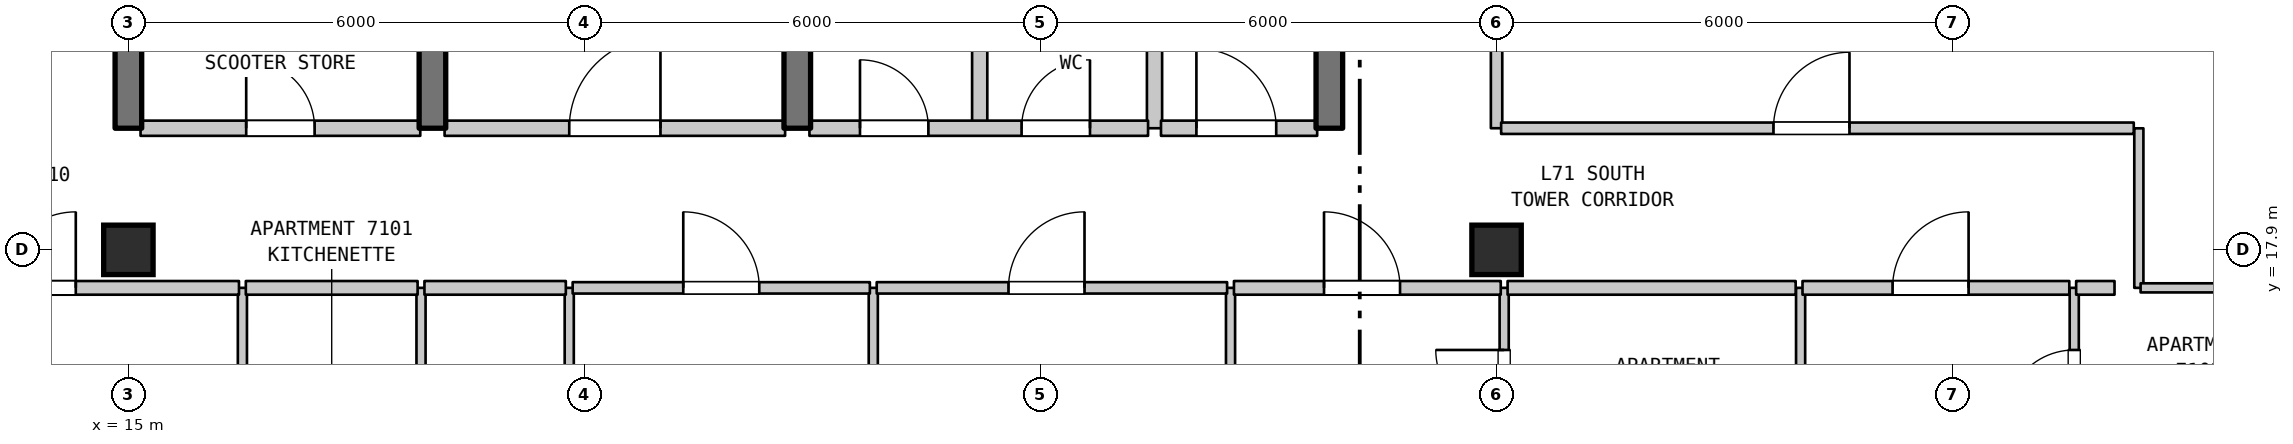
"""IFC4 building model, lengths in metres.
Left out: names, types, materials, properties, quantities, classifications, styles, units other than length and angle.
Written with IfcOpenShell. Run it as: python <this file> out.ifc"""

import sys

from ifc_helpers import new_model, si_unit, direction, frame, frame_2d, origin, origin_2d, place, context, subcontext, project, spatial, rectangle, extrude, element, fill, save


model = new_model("IFC4")
c1 = context("Model", 3, precision=1e-05, world=origin(), true_north=direction((0.0, 1.0)))
c2 = subcontext(c1, "Body", "Model", "MODEL_VIEW")
j1 = project(units=[si_unit("LENGTHUNIT", "METRE"), si_unit("PLANEANGLEUNIT", "RADIAN")], contexts=[c1])
p1 = place(None, origin())
s1 = spatial("IfcSite", under=j1, at=p1, CompositionType="ELEMENT")
p2 = place(p1, origin())
s2 = spatial("IfcBuilding", under=s1, at=p2, CompositionType="ELEMENT")
p3 = place(p2, frame((0.0, 0.0, 284.3)))
s3 = spatial("IfcBuildingStorey", under=s2, at=p3, CompositionType="ELEMENT", Elevation=284.3)
for number, where, z_axis, x_axis in (
    (1, (15.0, 17.9, 0.0), (0.0, 0.0, 1.0), (1.0, 0.0, 0.0)),
    (2, (33.0, 17.9, 0.0), (0.0, 0.0, 1.0), (1.0, 0.0, 0.0)),
):
    element("IfcColumn", number, at=place(p3, frame(where, z_axis=z_axis, x_axis=x_axis)), inside=s3, PredefinedType="COLUMN", context=c2, shape_type="SweptSolid", body=[
        extrude(rectangle(XDim=0.65, YDim=0.65, at=origin_2d()), origin(), (0.0, 0.0, 1.0), 3.7),
    ])
p4 = place(p3, frame((15.0, 19.5, 0.0), z_axis=(0.0, 0.0, 1.0), x_axis=(0.0, 1.0, 0.0)))
e3 = element("IfcWall", 3, at=p4, inside=s3, PredefinedType="SHEAR", context=c2, shape_type="SweptSolid", body=[
    extrude(rectangle(XDim=3.2, YDim=0.35, at=frame_2d((1.6, 0.0))), origin(), (0.0, 0.0, 1.0), 3.39),
])
p5 = place(p3, frame((16.5, 14.2, 0.0), z_axis=(0.0, 0.0, 1.0), x_axis=(0.0, 1.0, 0.0)))
e4 = element("IfcWall", 4, at=p5, inside=s3, PredefinedType="PARTITIONING", context=c2, shape_type="SweptSolid", body=[
    extrude(rectangle(XDim=3.2, YDim=0.12, at=frame_2d((1.6, 0.0))), origin(), (0.0, 0.0, 1.0), 3.39),
])
p6 = place(p5, frame((1.15, 0.0, 0.0)))
e5 = element("IfcOpeningElement", 5, at=p6, cuts=e4, PredefinedType="OPENING", context=c2, shape_type="SweptSolid", body=[
    extrude(rectangle(XDim=0.9, YDim=2.15, at=frame_2d((0.45, 1.075))), frame((0.0, 0.07, 0.0), z_axis=(0.0, -1.0, 0.0), x_axis=(1.0, 0.0, 0.0)), (0.0, 0.0, 1.0), 0.14),
])
p7 = place(p3, frame((18.85, 14.2, 0.0), z_axis=(0.0, 0.0, 1.0), x_axis=(0.0, 1.0, 0.0)))
e6 = element("IfcWall", 6, at=p7, inside=s3, PredefinedType="PARTITIONING", context=c2, shape_type="SweptSolid", body=[
    extrude(rectangle(XDim=3.2, YDim=0.12, at=frame_2d((1.6, 0.0))), origin(), (0.0, 0.0, 1.0), 3.39),
])
p8 = place(p3, frame((19.0, 19.5, 0.0), z_axis=(0.0, 0.0, 1.0), x_axis=(0.0, 1.0, 0.0)))
e7 = element("IfcWall", 7, at=p8, inside=s3, PredefinedType="SHEAR", context=c2, shape_type="SweptSolid", body=[
    extrude(rectangle(XDim=3.2, YDim=0.35, at=frame_2d((1.6, 0.0))), origin(), (0.0, 0.0, 1.0), 3.39),
])
p9 = place(p3, frame((20.8, 7.075, 0.0), z_axis=(0.0, 0.0, 1.0), x_axis=(0.0, 1.0, 0.0)))
e8 = element("IfcWall", 8, at=p9, inside=s3, PredefinedType="PARTITIONING", context=c2, shape_type="SweptSolid", body=[
    extrude(rectangle(XDim=10.325, YDim=0.12, at=frame_2d((5.163, 0.0))), origin(), (0.0, 0.0, 1.0), 3.39),
])
p10 = place(p3, frame((23.8, 19.5, 0.0), z_axis=(0.0, 0.0, 1.0), x_axis=(0.0, 1.0, 0.0)))
e9 = element("IfcWall", 9, at=p10, inside=s3, PredefinedType="SHEAR", context=c2, shape_type="SweptSolid", body=[
    extrude(rectangle(XDim=3.2, YDim=0.35, at=frame_2d((1.6, 0.0))), origin(), (0.0, 0.0, 1.0), 3.39),
])
p11 = place(p3, frame((24.8, 6.71, 0.0), z_axis=(0.0, 0.0, 1.0), x_axis=(0.0, 1.0, 0.0)))
e10 = element("IfcWall", 10, at=p11, inside=s3, PredefinedType="PARTITIONING", context=c2, shape_type="SweptSolid", body=[
    extrude(rectangle(XDim=10.69, YDim=0.12, at=frame_2d((5.345, 0.0))), origin(), (0.0, 0.0, 1.0), 3.39),
])
for number, where, z_axis, x_axis in (
    (11, (26.2, 19.5, 0.0), (0.0, 0.0, 1.0), (0.0, 1.0, 0.0)),
    (12, (28.5, 19.5, 0.0), (0.0, 0.0, 1.0), (0.0, 1.0, 0.0)),
):
    element("IfcWall", number, at=place(p3, frame(where, z_axis=z_axis, x_axis=x_axis)), inside=s3, PredefinedType="STANDARD", context=c2, shape_type="SweptSolid", body=[
        extrude(rectangle(XDim=3.2, YDim=0.2, at=frame_2d((1.6, 0.0))), origin(), (0.0, 0.0, 1.0), 3.39),
    ])
p12 = place(p3, frame((29.5, 6.71, 0.0), z_axis=(0.0, 0.0, 1.0), x_axis=(0.0, 1.0, 0.0)))
e13 = element("IfcWall", 13, at=p12, inside=s3, PredefinedType="PARTITIONING", context=c2, shape_type="SweptSolid", body=[
    extrude(rectangle(XDim=10.69, YDim=0.12, at=frame_2d((5.345, 0.0))), origin(), (0.0, 0.0, 1.0), 3.39),
])
p13 = place(p3, frame((30.8, 19.5, 0.0), z_axis=(0.0, 0.0, 1.0), x_axis=(0.0, 1.0, 0.0)))
e14 = element("IfcWall", 14, at=p13, inside=s3, PredefinedType="SHEAR", context=c2, shape_type="SweptSolid", body=[
    extrude(rectangle(XDim=3.2, YDim=0.35, at=frame_2d((1.6, 0.0))), origin(), (0.0, 0.0, 1.0), 3.39),
])
p14 = place(p3, frame((33.0, 19.5, 0.0), z_axis=(0.0, 0.0, 1.0), x_axis=(0.0, 1.0, 0.0)))
e15 = element("IfcWall", 15, at=p14, inside=s3, PredefinedType="STANDARD", context=c2, shape_type="SweptSolid", body=[
    extrude(rectangle(XDim=8.4, YDim=0.15, at=frame_2d((4.2, 0.0))), origin(), (0.0, 0.0, 1.0), 3.1),
])
p15 = place(p3, frame((33.1, 15.008, 0.0), z_axis=(0.0, 0.0, 1.0), x_axis=(0.0, 1.0, 0.0)))
e16 = element("IfcWall", 16, at=p15, inside=s3, PredefinedType="PARTITIONING", context=c2, shape_type="SweptSolid", body=[
    extrude(rectangle(XDim=2.392, YDim=0.12, at=frame_2d((1.196, 0.0))), origin(), (0.0, 0.0, 1.0), 3.1),
])
p16 = place(p15, frame((0.675, 0.0, 0.0)))
e17 = element("IfcOpeningElement", 17, at=p16, cuts=e16, PredefinedType="OPENING", context=c2, shape_type="SweptSolid", body=[
    extrude(rectangle(XDim=0.9, YDim=2.1, at=frame_2d((0.45, 1.05))), frame((0.0, 0.07, 0.0), z_axis=(0.0, -1.0, 0.0), x_axis=(1.0, 0.0, 0.0)), (0.0, 0.0, 1.0), 0.14),
])
p17 = place(p3, frame((37.0, 15.008, 0.0), z_axis=(0.0, 0.0, 1.0), x_axis=(0.0, 1.0, 0.0)))
e18 = element("IfcWall", 18, at=p17, inside=s3, PredefinedType="PARTITIONING", context=c2, shape_type="SweptSolid", body=[
    extrude(rectangle(XDim=2.392, YDim=0.12, at=frame_2d((1.196, 0.0))), origin(), (0.0, 0.0, 1.0), 3.39),
])
p18 = place(p3, frame((40.6, 15.008, 0.0), z_axis=(0.0, 0.0, 1.0), x_axis=(0.0, 1.0, 0.0)))
e19 = element("IfcWall", 19, at=p18, inside=s3, PredefinedType="PARTITIONING", context=c2, shape_type="SweptSolid", body=[
    extrude(rectangle(XDim=2.392, YDim=0.12, at=frame_2d((1.196, 0.0))), origin(), (0.0, 0.0, 1.0), 3.39),
])
p19 = place(p18, frame((0.675, 0.0, 0.0)))
e20 = element("IfcOpeningElement", 20, at=p19, cuts=e19, PredefinedType="OPENING", context=c2, shape_type="SweptSolid", body=[
    extrude(rectangle(XDim=0.9, YDim=2.1, at=frame_2d((0.45, 1.05))), frame((0.0, 0.07, 0.0), z_axis=(0.0, -1.0, 0.0), x_axis=(1.0, 0.0, 0.0)), (0.0, 0.0, 1.0), 0.14),
])
p20 = place(p3, frame((41.45, 17.4, 0.0), z_axis=(0.0, 0.0, 1.0), x_axis=(0.0, 1.0, 0.0)))
e21 = element("IfcWall", 21, at=p20, inside=s3, PredefinedType="PARTITIONING", context=c2, shape_type="SweptSolid", body=[
    extrude(rectangle(XDim=2.099, YDim=0.12, at=frame_2d((1.05, 0.0))), origin(), (0.0, 0.0, 1.0), 3.39),
])
p21 = place(p3, frame((12.975, 17.4, 0.0), z_axis=(0.0, 0.0, 1.0), x_axis=(1.0, 0.0, 0.0)))
e22 = element("IfcWall", 22, at=p21, inside=s3, PredefinedType="STANDARD", context=c2, shape_type="SweptSolid", body=[
    extrude(rectangle(XDim=3.48, YDim=0.18, at=frame_2d((1.74, 0.0))), origin(), (0.0, 0.0, 1.0), 3.39),
])
p22 = place(p21, frame((0.333, 0.0, 0.0)))
e23 = element("IfcOpeningElement", 23, at=p22, cuts=e22, PredefinedType="OPENING", context=c2, shape_type="SweptSolid", body=[
    extrude(rectangle(XDim=1.0, YDim=2.15, at=frame_2d((0.5, 1.075))), frame((0.0, 0.1, 0.0), z_axis=(0.0, -1.0, 0.0), x_axis=(1.0, 0.0, 0.0)), (0.0, 0.0, 1.0), 0.2),
])
p23 = place(p3, frame((16.545, 17.4, 0.0), z_axis=(0.0, 0.0, 1.0), x_axis=(1.0, 0.0, 0.0)))
e24 = element("IfcWall", 24, at=p23, inside=s3, PredefinedType="STANDARD", context=c2, shape_type="SweptSolid", body=[
    extrude(rectangle(XDim=2.26, YDim=0.18, at=frame_2d((1.13, 0.0))), origin(), (0.0, 0.0, 1.0), 3.39),
])
p24 = place(p3, frame((18.895, 17.4, 0.0), z_axis=(0.0, 0.0, 1.0), x_axis=(1.0, 0.0, 0.0)))
e25 = element("IfcWall", 25, at=p24, inside=s3, PredefinedType="STANDARD", context=c2, shape_type="SweptSolid", body=[
    extrude(rectangle(XDim=1.86, YDim=0.18, at=frame_2d((0.93, 0.0))), origin(), (0.0, 0.0, 1.0), 3.39),
])
p25 = place(p3, frame((20.845, 17.4, 0.0), z_axis=(0.0, 0.0, 1.0), x_axis=(1.0, 0.0, 0.0)))
e26 = element("IfcWall", 26, at=p25, inside=s3, PredefinedType="STANDARD", context=c2, shape_type="SweptSolid", body=[
    extrude(rectangle(XDim=3.91, YDim=0.15, at=frame_2d((1.955, 0.0))), origin(), (0.0, 0.0, 1.0), 3.39),
])
p26 = place(p25, frame((1.455, 0.0, 0.0)))
e27 = element("IfcOpeningElement", 27, at=p26, cuts=e26, PredefinedType="OPENING", context=c2, shape_type="SweptSolid", body=[
    extrude(rectangle(XDim=1.0, YDim=2.15, at=frame_2d((0.5, 1.075))), frame((0.0, 0.085, 0.0), z_axis=(0.0, -1.0, 0.0), x_axis=(1.0, 0.0, 0.0)), (0.0, 0.0, 1.0), 0.17),
])
p27 = place(p3, frame((24.845, 17.4, 0.0), z_axis=(0.0, 0.0, 1.0), x_axis=(1.0, 0.0, 0.0)))
e28 = element("IfcWall", 28, at=p27, inside=s3, PredefinedType="STANDARD", context=c2, shape_type="SweptSolid", body=[
    extrude(rectangle(XDim=4.61, YDim=0.15, at=frame_2d((2.305, 0.0))), origin(), (0.0, 0.0, 1.0), 3.39),
])
p28 = place(p27, frame((1.734, 0.0, 0.0)))
e29 = element("IfcOpeningElement", 29, at=p28, cuts=e28, PredefinedType="OPENING", context=c2, shape_type="SweptSolid", body=[
    extrude(rectangle(XDim=1.0, YDim=2.15, at=frame_2d((0.5, 1.075))), frame((0.0, 0.085, 0.0), z_axis=(0.0, -1.0, 0.0), x_axis=(1.0, 0.0, 0.0)), (0.0, 0.0, 1.0), 0.17),
])
p29 = place(p3, frame((29.545, 17.4, 0.0), z_axis=(0.0, 0.0, 1.0), x_axis=(1.0, 0.0, 0.0)))
e30 = element("IfcWall", 30, at=p29, inside=s3, PredefinedType="STANDARD", context=c2, shape_type="SweptSolid", body=[
    extrude(rectangle(XDim=3.51, YDim=0.18, at=frame_2d((1.755, 0.0))), origin(), (0.0, 0.0, 1.0), 3.39),
])
p30 = place(p29, frame((1.185, 0.0, 0.0)))
e31 = element("IfcOpeningElement", 31, at=p30, cuts=e30, PredefinedType="OPENING", context=c2, shape_type="SweptSolid", body=[
    extrude(rectangle(XDim=1.0, YDim=2.15, at=frame_2d((0.5, 1.075))), frame((0.0, 0.1, 0.0), z_axis=(0.0, -1.0, 0.0), x_axis=(1.0, 0.0, 0.0)), (0.0, 0.0, 1.0), 0.2),
])
p31 = place(p3, frame((33.145, 17.4, 0.0), z_axis=(0.0, 0.0, 1.0), x_axis=(1.0, 0.0, 0.0)))
e32 = element("IfcWall", 32, at=p31, inside=s3, PredefinedType="STANDARD", context=c2, shape_type="SweptSolid", body=[
    extrude(rectangle(XDim=3.79, YDim=0.18, at=frame_2d((1.895, 0.0))), origin(), (0.0, 0.0, 1.0), 3.39),
])
p32 = place(p3, frame((37.025, 17.4, 0.0), z_axis=(0.0, 0.0, 1.0), x_axis=(1.0, 0.0, 0.0)))
e33 = element("IfcWall", 33, at=p32, inside=s3, PredefinedType="STANDARD", context=c2, shape_type="SweptSolid", body=[
    extrude(rectangle(XDim=3.51, YDim=0.18, at=frame_2d((1.755, 0.0))), origin(), (0.0, 0.0, 1.0), 3.39),
])
p33 = place(p32, frame((1.185, 0.0, 0.0)))
e34 = element("IfcOpeningElement", 34, at=p33, cuts=e33, PredefinedType="OPENING", context=c2, shape_type="SweptSolid", body=[
    extrude(rectangle(XDim=1.0, YDim=2.15, at=frame_2d((0.5, 1.075))), frame((0.0, 0.1, 0.0), z_axis=(0.0, -1.0, 0.0), x_axis=(1.0, 0.0, 0.0)), (0.0, 0.0, 1.0), 0.2),
])
p34 = place(p3, frame((40.625, 17.4, 0.0), z_axis=(0.0, 0.0, 1.0), x_axis=(1.0, 0.0, 0.0)))
e35 = element("IfcWall", 35, at=p34, inside=s3, PredefinedType="STANDARD", context=c2, shape_type="SweptSolid", body=[
    extrude(rectangle(XDim=0.505, YDim=0.18, at=frame_2d((0.252, 0.0))), origin(), (0.0, 0.0, 1.0), 3.39),
])
p35 = place(p3, frame((41.473, 17.4, 0.0), z_axis=(0.0, 0.0, 1.0), x_axis=(1.0, 0.0, 0.0)))
e36 = element("IfcWall", 36, at=p35, inside=s3, PredefinedType="PARTITIONING", context=c2, shape_type="SweptSolid", body=[
    extrude(rectangle(XDim=2.031, YDim=0.12, at=frame_2d((1.016, 0.0))), origin(), (0.0, 0.0, 1.0), 3.39),
])
p36 = place(p3, frame((15.16, 19.5, 0.0), z_axis=(0.0, 0.0, 1.0), x_axis=(1.0, 0.0, 0.0)))
e37 = element("IfcWall", 37, at=p36, inside=s3, PredefinedType="STANDARD", context=c2, shape_type="SweptSolid", body=[
    extrude(rectangle(XDim=3.68, YDim=0.2, at=frame_2d((1.84, 0.0))), origin(), (0.0, 0.0, 1.0), 3.39),
])
p37 = place(p36, frame((1.39, 0.0, 0.0)))
e38 = element("IfcOpeningElement", 38, at=p37, cuts=e37, PredefinedType="OPENING", context=c2, shape_type="SweptSolid", body=[
    extrude(rectangle(XDim=0.9, YDim=2.15, at=frame_2d((0.45, 1.075))), frame((0.0, 0.11, 0.0), z_axis=(0.0, -1.0, 0.0), x_axis=(1.0, 0.0, 0.0)), (0.0, 0.0, 1.0), 0.22),
])
p38 = place(p3, frame((19.16, 19.5, 0.0), z_axis=(0.0, 0.0, 1.0), x_axis=(1.0, 0.0, 0.0)))
e39 = element("IfcWall", 39, at=p38, inside=s3, PredefinedType="STANDARD", context=c2, shape_type="SweptSolid", body=[
    extrude(rectangle(XDim=4.48, YDim=0.2, at=frame_2d((2.24, 0.0))), origin(), (0.0, 0.0, 1.0), 3.39),
])
p39 = place(p38, frame((1.64, 0.0, 0.0)))
e40 = element("IfcOpeningElement", 40, at=p39, cuts=e39, PredefinedType="OPENING", context=c2, shape_type="SweptSolid", body=[
    extrude(rectangle(XDim=1.2, YDim=2.2, at=frame_2d((0.6, 1.1))), frame((0.0, 0.11, 0.0), z_axis=(0.0, -1.0, 0.0), x_axis=(1.0, 0.0, 0.0)), (0.0, 0.0, 1.0), 0.22),
])
p40 = place(p3, frame((23.96, 19.5, 0.0), z_axis=(0.0, 0.0, 1.0), x_axis=(1.0, 0.0, 0.0)))
e41 = element("IfcWall", 41, at=p40, inside=s3, PredefinedType="STANDARD", context=c2, shape_type="SweptSolid", body=[
    extrude(rectangle(XDim=4.455, YDim=0.2, at=frame_2d((2.228, 0.0))), origin(), (0.0, 0.0, 1.0), 3.39),
])
p41 = place(p40, frame((0.665, 0.0, 0.0)))
e42 = element("IfcOpeningElement", 42, at=p41, cuts=e41, PredefinedType="OPENING", context=c2, shape_type="SweptSolid", body=[
    extrude(rectangle(XDim=0.9, YDim=2.15, at=frame_2d((0.45, 1.075))), frame((0.0, 0.11, 0.0), z_axis=(0.0, -1.0, 0.0), x_axis=(1.0, 0.0, 0.0)), (0.0, 0.0, 1.0), 0.22),
])
p42 = place(p40, frame((2.791, 0.0, 0.0)))
e43 = element("IfcOpeningElement", 43, at=p42, cuts=e41, PredefinedType="OPENING", context=c2, shape_type="SweptSolid", body=[
    extrude(rectangle(XDim=0.9, YDim=2.15, at=frame_2d((0.45, 1.075))), frame((0.0, 0.11, 0.0), z_axis=(0.0, -1.0, 0.0), x_axis=(1.0, 0.0, 0.0)), (0.0, 0.0, 1.0), 0.22),
])
p43 = place(p3, frame((28.585, 19.5, 0.0), z_axis=(0.0, 0.0, 1.0), x_axis=(1.0, 0.0, 0.0)))
e44 = element("IfcWall", 44, at=p43, inside=s3, PredefinedType="STANDARD", context=c2, shape_type="SweptSolid", body=[
    extrude(rectangle(XDim=2.055, YDim=0.2, at=frame_2d((1.027, 0.0))), origin(), (0.0, 0.0, 1.0), 3.39),
])
p44 = place(p43, frame((0.466, 0.0, 0.0)))
e45 = element("IfcOpeningElement", 45, at=p44, cuts=e44, PredefinedType="OPENING", context=c2, shape_type="SweptSolid", body=[
    extrude(rectangle(XDim=1.05, YDim=2.15, at=frame_2d((0.525, 1.075))), frame((0.0, 0.11, 0.0), z_axis=(0.0, -1.0, 0.0), x_axis=(1.0, 0.0, 0.0)), (0.0, 0.0, 1.0), 0.22),
])
p45 = place(p3, frame((33.06, 19.5, 0.0), z_axis=(0.0, 0.0, 1.0), x_axis=(1.0, 0.0, 0.0)))
e46 = element("IfcWall", 46, at=p45, inside=s3, PredefinedType="STANDARD", context=c2, shape_type="SweptSolid", body=[
    extrude(rectangle(XDim=8.323, YDim=0.15, at=frame_2d((4.162, 0.0))), origin(), (0.0, 0.0, 1.0), 3.39),
])
p46 = place(p45, frame((3.583, 0.0, 0.0)))
e47 = element("IfcOpeningElement", 47, at=p46, cuts=e46, PredefinedType="OPENING", context=c2, shape_type="SweptSolid", body=[
    extrude(rectangle(XDim=1.0, YDim=2.15, at=frame_2d((0.5, 1.075))), frame((0.0, 0.085, 0.0), z_axis=(0.0, -1.0, 0.0), x_axis=(1.0, 0.0, 0.0)), (0.0, 0.0, 1.0), 0.17),
])
p47 = place(p16, origin())
e48 = element("IfcDoor", 48, at=p47, inside=s3, OperationType="SINGLE_SWING_RIGHT", PredefinedType="DOOR", context=c2, shape_type="SweptSolid", body=[
    extrude(rectangle(XDim=0.9, YDim=2.1, at=frame_2d((0.45, 1.05))), frame((0.0, 0.025, 0.0), z_axis=(0.0, -1.0, 0.0), x_axis=(1.0, 0.0, 0.0)), (0.0, 0.0, 1.0), 0.05),
])
fill(e17, e48)
p48 = place(p19, origin())
e49 = element("IfcDoor", 49, at=p48, inside=s3, OperationType="SINGLE_SWING_LEFT", PredefinedType="DOOR", context=c2, shape_type="SweptSolid", body=[
    extrude(rectangle(XDim=0.9, YDim=2.1, at=frame_2d((0.45, 1.05))), frame((0.0, 0.025, 0.0), z_axis=(0.0, -1.0, 0.0), x_axis=(1.0, 0.0, 0.0)), (0.0, 0.0, 1.0), 0.05),
])
fill(e20, e49)
p49 = place(p22, origin())
e50 = element("IfcDoor", 50, at=p49, inside=s3, OperationType="SINGLE_SWING_RIGHT", PredefinedType="DOOR", context=c2, shape_type="SweptSolid", body=[
    extrude(rectangle(XDim=1.0, YDim=2.15, at=frame_2d((0.5, 1.075))), frame((0.0, 0.025, 0.0), z_axis=(0.0, -1.0, 0.0), x_axis=(1.0, 0.0, 0.0)), (0.0, 0.0, 1.0), 0.05),
])
fill(e23, e50)
p50 = place(p26, origin())
e51 = element("IfcDoor", 51, at=p50, inside=s3, OperationType="SINGLE_SWING_LEFT", PredefinedType="DOOR", context=c2, shape_type="SweptSolid", body=[
    extrude(rectangle(XDim=1.0, YDim=2.15, at=frame_2d((0.5, 1.075))), frame((0.0, 0.025, 0.0), z_axis=(0.0, -1.0, 0.0), x_axis=(1.0, 0.0, 0.0)), (0.0, 0.0, 1.0), 0.05),
])
fill(e27, e51)
p51 = place(p28, origin())
e52 = element("IfcDoor", 52, at=p51, inside=s3, OperationType="SINGLE_SWING_RIGHT", PredefinedType="DOOR", context=c2, shape_type="SweptSolid", body=[
    extrude(rectangle(XDim=1.0, YDim=2.15, at=frame_2d((0.5, 1.075))), frame((0.0, 0.025, 0.0), z_axis=(0.0, -1.0, 0.0), x_axis=(1.0, 0.0, 0.0)), (0.0, 0.0, 1.0), 0.05),
])
fill(e29, e52)
p52 = place(p30, origin())
e53 = element("IfcDoor", 53, at=p52, inside=s3, OperationType="SINGLE_SWING_LEFT", PredefinedType="DOOR", context=c2, shape_type="SweptSolid", body=[
    extrude(rectangle(XDim=1.0, YDim=2.15, at=frame_2d((0.5, 1.075))), frame((0.0, 0.025, 0.0), z_axis=(0.0, -1.0, 0.0), x_axis=(1.0, 0.0, 0.0)), (0.0, 0.0, 1.0), 0.05),
])
fill(e31, e53)
p53 = place(p33, origin())
e54 = element("IfcDoor", 54, at=p53, inside=s3, OperationType="SINGLE_SWING_RIGHT", PredefinedType="DOOR", context=c2, shape_type="SweptSolid", body=[
    extrude(rectangle(XDim=1.0, YDim=2.15, at=frame_2d((0.5, 1.075))), frame((0.0, 0.025, 0.0), z_axis=(0.0, -1.0, 0.0), x_axis=(1.0, 0.0, 0.0)), (0.0, 0.0, 1.0), 0.05),
])
fill(e34, e54)
p54 = place(p37, origin())
e55 = element("IfcDoor", 55, at=p54, inside=s3, OperationType="SINGLE_SWING_LEFT", PredefinedType="DOOR", context=c2, shape_type="SweptSolid", body=[
    extrude(rectangle(XDim=0.9, YDim=2.15, at=frame_2d((0.45, 1.075))), frame((0.0, 0.025, 0.0), z_axis=(0.0, -1.0, 0.0), x_axis=(1.0, 0.0, 0.0)), (0.0, 0.0, 1.0), 0.05),
])
fill(e38, e55)
p55 = place(p39, origin())
e56 = element("IfcDoor", 56, at=p55, inside=s3, OperationType="SINGLE_SWING_RIGHT", PredefinedType="DOOR", context=c2, shape_type="SweptSolid", body=[
    extrude(rectangle(XDim=1.2, YDim=2.2, at=frame_2d((0.6, 1.1))), frame((0.0, 0.025, 0.0), z_axis=(0.0, -1.0, 0.0), x_axis=(1.0, 0.0, 0.0)), (0.0, 0.0, 1.0), 0.05),
])
fill(e40, e56)
p56 = place(p41, origin())
e57 = element("IfcDoor", 57, at=p56, inside=s3, OperationType="SINGLE_SWING_LEFT", PredefinedType="DOOR", context=c2, shape_type="SweptSolid", body=[
    extrude(rectangle(XDim=0.9, YDim=2.15, at=frame_2d((0.45, 1.075))), frame((0.0, 0.025, 0.0), z_axis=(0.0, -1.0, 0.0), x_axis=(1.0, 0.0, 0.0)), (0.0, 0.0, 1.0), 0.05),
])
fill(e42, e57)
p57 = place(p42, origin())
e58 = element("IfcDoor", 58, at=p57, inside=s3, OperationType="SINGLE_SWING_RIGHT", PredefinedType="DOOR", context=c2, shape_type="SweptSolid", body=[
    extrude(rectangle(XDim=0.9, YDim=2.15, at=frame_2d((0.45, 1.075))), frame((0.0, 0.025, 0.0), z_axis=(0.0, -1.0, 0.0), x_axis=(1.0, 0.0, 0.0)), (0.0, 0.0, 1.0), 0.05),
])
fill(e43, e58)
p58 = place(p44, origin())
e59 = element("IfcDoor", 59, at=p58, inside=s3, OperationType="SINGLE_SWING_LEFT", PredefinedType="DOOR", context=c2, shape_type="SweptSolid", body=[
    extrude(rectangle(XDim=1.05, YDim=2.15, at=frame_2d((0.525, 1.075))), frame((0.0, 0.025, 0.0), z_axis=(0.0, -1.0, 0.0), x_axis=(1.0, 0.0, 0.0)), (0.0, 0.0, 1.0), 0.05),
])
fill(e45, e59)
p59 = place(p46, origin())
e60 = element("IfcDoor", 60, at=p59, inside=s3, OperationType="SINGLE_SWING_RIGHT", PredefinedType="DOOR", context=c2, shape_type="SweptSolid", body=[
    extrude(rectangle(XDim=1.0, YDim=2.15, at=frame_2d((0.5, 1.075))), frame((0.0, 0.025, 0.0), z_axis=(0.0, -1.0, 0.0), x_axis=(1.0, 0.0, 0.0)), (0.0, 0.0, 1.0), 0.05),
])
fill(e47, e60)
save(model, sys.argv[1])
